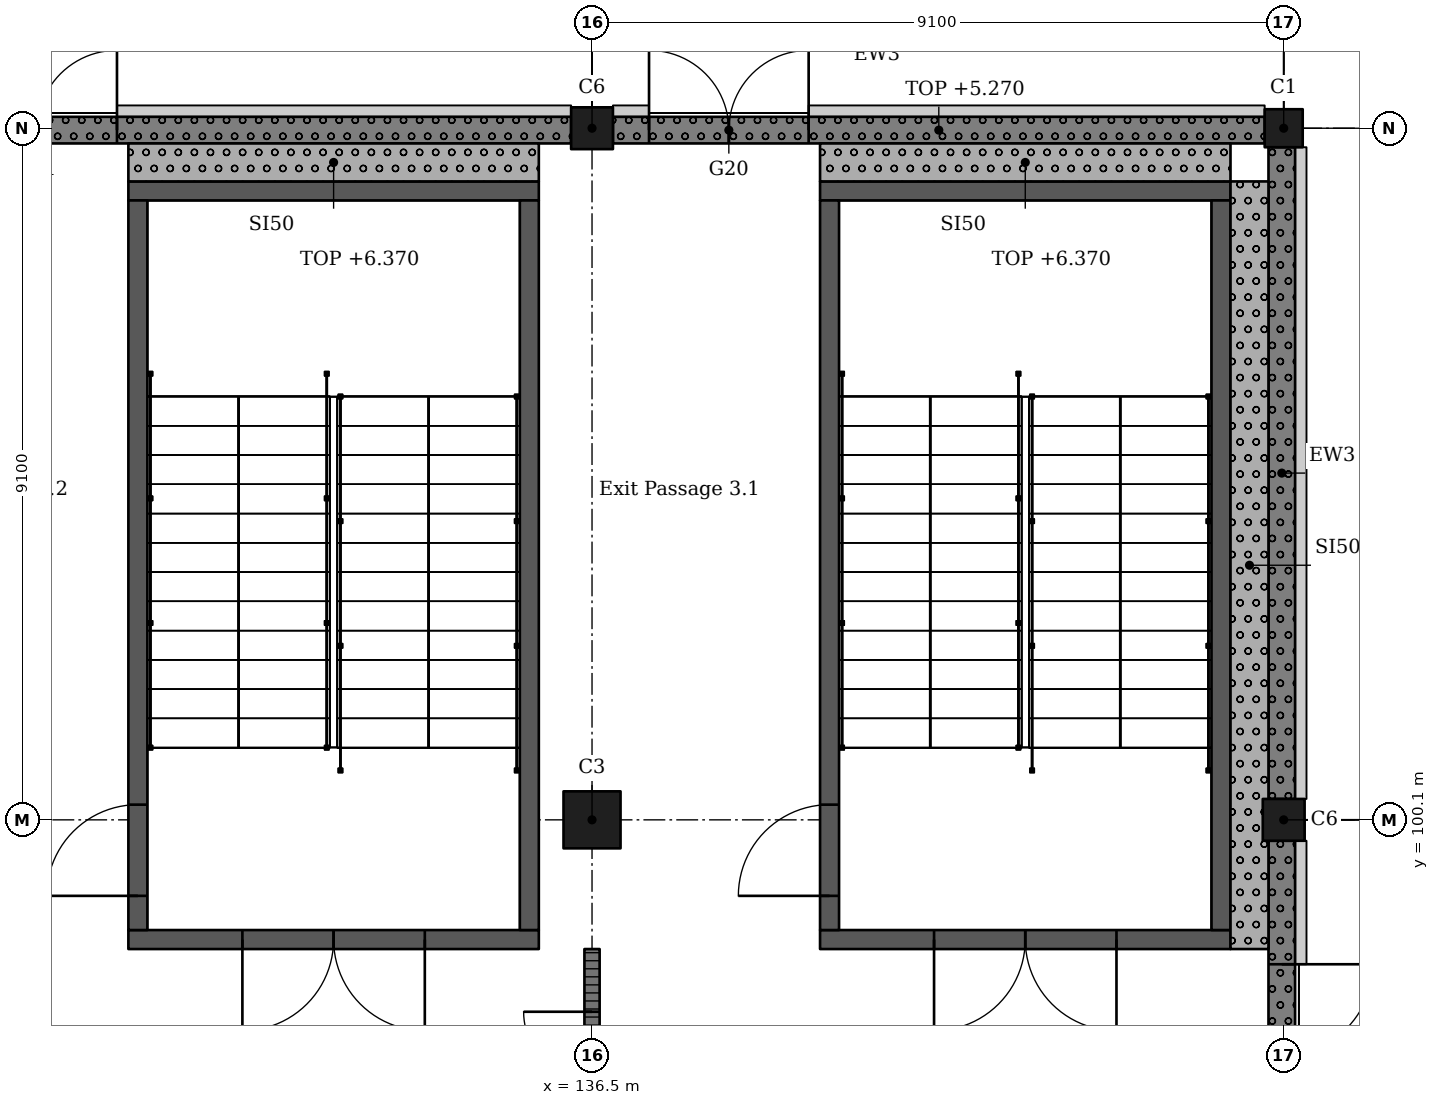
"""IFC4 building model, lengths in metres.
Left out: names, types, materials, properties, quantities, classifications, styles, units other than length and angle.
Written with IfcOpenShell. Run it as: python <this file> out.ifc"""

import sys

from ifc_helpers import new_model, si_unit, direction, frame, frame_2d, origin, origin_2d, place, context, subcontext, project, spatial, rectangle, extrude, element, fill, save


model = new_model("IFC4")
c1 = context("Model", 3, precision=1e-05, world=origin(), true_north=direction((0.0, 1.0)))
c2 = subcontext(c1, "Body", "Model", "MODEL_VIEW")
j1 = project(units=[si_unit("LENGTHUNIT", "METRE"), si_unit("PLANEANGLEUNIT", "RADIAN")], contexts=[c1])
p1 = place(None, origin())
s1 = spatial("IfcSite", under=j1, at=p1, CompositionType="ELEMENT")
p2 = place(p1, origin())
s2 = spatial("IfcBuilding", under=s1, at=p2, CompositionType="ELEMENT")
p3 = place(p2, origin())
s3 = spatial("IfcBuildingStorey", under=s2, at=p3, CompositionType="ELEMENT", Elevation=0.0)
p4 = place(p3, frame((136.5, 100.1, -0.4), z_axis=(0.0, 0.0, 1.0), x_axis=(1.0, 0.0, 0.0)))
e1 = element("IfcColumn", 1, at=p4, inside=s3, PredefinedType="COLUMN", context=c2, shape_type="SweptSolid", body=[
    extrude(rectangle(XDim=0.75, YDim=0.75, at=origin_2d()), origin(), (0.0, 0.0, 1.0), 6.77),
])
for number, where, z_axis, x_axis in (
    (2, (136.5, 109.2, -0.4), (0.0, 0.0, 1.0), (1.0, 0.0, 0.0)),
    (3, (145.6, 100.1, -0.4), (0.0, 0.0, 1.0), (1.0, 0.0, 0.0)),
):
    element("IfcColumn", number, at=place(p3, frame(where, z_axis=z_axis, x_axis=x_axis)), inside=s3, PredefinedType="COLUMN", context=c2, shape_type="SweptSolid", body=[
        extrude(rectangle(XDim=0.55, YDim=0.55, at=origin_2d()), origin(), (0.0, 0.0, 1.0), 6.77),
    ])
p5 = place(p3, frame((145.6, 109.2, -0.4), z_axis=(0.0, 0.0, 1.0), x_axis=(1.0, 0.0, 0.0)))
e4 = element("IfcColumn", 4, at=p5, inside=s3, PredefinedType="COLUMN", context=c2, shape_type="SweptSolid", body=[
    extrude(rectangle(XDim=0.5, YDim=0.5, at=origin_2d()), origin(), (0.0, 0.0, 1.0), 6.77),
])
p6 = place(p3, frame((144.9, 98.525, -0.4), z_axis=(0.0, 0.0, 1.0), x_axis=(-1.0, 0.0, 0.0)))
e5 = element("IfcWall", 5, at=p6, inside=s3, PredefinedType="SHEAR", context=c2, shape_type="SweptSolid", body=[
    extrude(rectangle(XDim=5.4, YDim=0.25, at=frame_2d((2.7, 0.0))), origin(), (0.0, 0.0, 1.0), 6.77),
])
p7 = place(p6, frame((1.5, 0.0, 0.4)))
e6 = element("IfcOpeningElement", 6, at=p7, cuts=e5, PredefinedType="OPENING", context=c2, shape_type="SweptSolid", body=[
    extrude(rectangle(XDim=2.4, YDim=2.1, at=frame_2d((1.2, 1.05))), frame((0.0, 0.135, 0.0), z_axis=(0.0, -1.0, 0.0), x_axis=(1.0, 0.0, 0.0)), (0.0, 0.0, 1.0), 0.27),
])
p8 = place(p3, frame((144.9, 108.375, -0.4), z_axis=(0.0, 0.0, 1.0), x_axis=(-1.0, 0.0, 0.0)))
e7 = element("IfcWall", 7, at=p8, inside=s3, PredefinedType="SHEAR", context=c2, shape_type="SweptSolid", body=[
    extrude(rectangle(XDim=5.4, YDim=0.25, at=frame_2d((2.7, 0.0))), origin(), (0.0, 0.0, 1.0), 6.77),
])
p9 = place(p3, frame((139.625, 108.25, -0.4), z_axis=(0.0, 0.0, 1.0), x_axis=(0.0, -1.0, 0.0)))
e8 = element("IfcWall", 8, at=p9, inside=s3, PredefinedType="SHEAR", context=c2, shape_type="SweptSolid", body=[
    extrude(rectangle(XDim=9.6, YDim=0.25, at=frame_2d((4.8, 0.0))), origin(), (0.0, 0.0, 1.0), 6.77),
])
p10 = place(p9, frame((7.95, 0.0, 0.4)))
e9 = element("IfcOpeningElement", 9, at=p10, cuts=e8, PredefinedType="OPENING", context=c2, shape_type="SweptSolid", body=[
    extrude(rectangle(XDim=1.2, YDim=2.1, at=frame_2d((0.6, 1.05))), frame((0.0, 0.135, 0.0), z_axis=(0.0, -1.0, 0.0), x_axis=(1.0, 0.0, 0.0)), (0.0, 0.0, 1.0), 0.27),
])
p11 = place(p3, frame((144.775, 108.25, -0.4), z_axis=(0.0, 0.0, 1.0), x_axis=(0.0, -1.0, 0.0)))
e10 = element("IfcWall", 10, at=p11, inside=s3, PredefinedType="SHEAR", context=c2, shape_type="SweptSolid", body=[
    extrude(rectangle(XDim=9.6, YDim=0.25, at=frame_2d((4.8, 0.0))), origin(), (0.0, 0.0, 1.0), 6.77),
])
p12 = place(p3, frame((135.8, 98.525, -0.4), z_axis=(0.0, 0.0, 1.0), x_axis=(-1.0, 0.0, 0.0)))
e11 = element("IfcWall", 11, at=p12, inside=s3, PredefinedType="SHEAR", context=c2, shape_type="SweptSolid", body=[
    extrude(rectangle(XDim=5.4, YDim=0.25, at=frame_2d((2.7, 0.0))), origin(), (0.0, 0.0, 1.0), 6.77),
])
p13 = place(p12, frame((1.5, 0.0, 0.4)))
e12 = element("IfcOpeningElement", 12, at=p13, cuts=e11, PredefinedType="OPENING", context=c2, shape_type="SweptSolid", body=[
    extrude(rectangle(XDim=2.4, YDim=2.1, at=frame_2d((1.2, 1.05))), frame((0.0, 0.135, 0.0), z_axis=(0.0, -1.0, 0.0), x_axis=(1.0, 0.0, 0.0)), (0.0, 0.0, 1.0), 0.27),
])
p14 = place(p3, frame((135.8, 108.375, -0.4), z_axis=(0.0, 0.0, 1.0), x_axis=(-1.0, 0.0, 0.0)))
e13 = element("IfcWall", 13, at=p14, inside=s3, PredefinedType="SHEAR", context=c2, shape_type="SweptSolid", body=[
    extrude(rectangle(XDim=5.4, YDim=0.25, at=frame_2d((2.7, 0.0))), origin(), (0.0, 0.0, 1.0), 6.77),
])
p15 = place(p3, frame((130.525, 108.25, -0.4), z_axis=(0.0, 0.0, 1.0), x_axis=(0.0, -1.0, 0.0)))
e14 = element("IfcWall", 14, at=p15, inside=s3, PredefinedType="SHEAR", context=c2, shape_type="SweptSolid", body=[
    extrude(rectangle(XDim=9.6, YDim=0.25, at=frame_2d((4.8, 0.0))), origin(), (0.0, 0.0, 1.0), 6.77),
])
p16 = place(p15, frame((7.95, 0.0, 0.4)))
e15 = element("IfcOpeningElement", 15, at=p16, cuts=e14, PredefinedType="OPENING", context=c2, shape_type="SweptSolid", body=[
    extrude(rectangle(XDim=1.2, YDim=2.1, at=frame_2d((0.6, 1.05))), frame((0.0, 0.135, 0.0), z_axis=(0.0, -1.0, 0.0), x_axis=(1.0, 0.0, 0.0)), (0.0, 0.0, 1.0), 0.27),
])
p17 = place(p3, frame((135.675, 108.25, -0.4), z_axis=(0.0, 0.0, 1.0), x_axis=(0.0, -1.0, 0.0)))
e16 = element("IfcWall", 16, at=p17, inside=s3, PredefinedType="SHEAR", context=c2, shape_type="SweptSolid", body=[
    extrude(rectangle(XDim=9.6, YDim=0.25, at=frame_2d((4.8, 0.0))), origin(), (0.0, 0.0, 1.0), 6.77),
])
p18 = place(p3, frame((145.575, 91.325, 0.0), z_axis=(0.0, 0.0, 1.0), x_axis=(0.0, 1.0, 0.0)))
e17 = element("IfcWall", 17, at=p18, inside=s3, PredefinedType="SOLIDWALL", context=c2, shape_type="SweptSolid", body=[
    extrude(rectangle(XDim=8.5, YDim=0.35, at=frame_2d((4.25, 0.0))), origin(), (0.0, 0.0, 1.0), 5.27),
])
p19 = place(p18, frame((4.475, 0.0, 0.0)))
e18 = element("IfcOpeningElement", 18, at=p19, cuts=e17, PredefinedType="OPENING", context=c2, shape_type="SweptSolid", body=[
    extrude(rectangle(XDim=2.4, YDim=2.4, at=frame_2d((1.2, 1.2))), frame((0.0, 0.185, 0.0), z_axis=(0.0, -1.0, 0.0), x_axis=(1.0, 0.0, 0.0)), (0.0, 0.0, 1.0), 0.37),
])
p20 = place(p18, frame((1.475, 0.0, 0.0)))
e19 = element("IfcOpeningElement", 19, at=p20, cuts=e17, PredefinedType="OPENING", context=c2, shape_type="SweptSolid", body=[
    extrude(rectangle(XDim=2.4, YDim=2.4, at=frame_2d((1.2, 1.2))), frame((0.0, 0.185, 0.0), z_axis=(0.0, -1.0, 0.0), x_axis=(1.0, 0.0, 0.0)), (0.0, 0.0, 1.0), 0.37),
])
p21 = place(p3, frame((145.575, 100.375, 0.0), z_axis=(0.0, 0.0, 1.0), x_axis=(0.0, 1.0, 0.0)))
e20 = element("IfcWall", 20, at=p21, inside=s3, PredefinedType="SOLIDWALL", context=c2, shape_type="SweptSolid", body=[
    extrude(rectangle(XDim=8.575, YDim=0.35, at=frame_2d((4.288, 0.0))), origin(), (0.0, 0.0, 1.0), 5.27),
])
p22 = place(p3, frame((145.35, 109.175, 0.0), z_axis=(0.0, 0.0, 1.0), x_axis=(-1.0, 0.0, 0.0)))
e21 = element("IfcWall", 21, at=p22, inside=s3, PredefinedType="SOLIDWALL", context=c2, shape_type="SweptSolid", body=[
    extrude(rectangle(XDim=8.575, YDim=0.35, at=frame_2d((4.288, 0.0))), origin(), (0.0, 0.0, 1.0), 5.27),
])
p23 = place(p22, frame((6.0, 0.0, 0.0)))
e22 = element("IfcOpeningElement", 22, at=p23, cuts=e21, PredefinedType="OPENING", context=c2, shape_type="SweptSolid", body=[
    extrude(rectangle(XDim=2.1, YDim=2.4, at=frame_2d((1.05, 1.2))), frame((0.0, 0.185, 0.0), z_axis=(0.0, -1.0, 0.0), x_axis=(1.0, 0.0, 0.0)), (0.0, 0.0, 1.0), 0.37),
])
p24 = place(p3, frame((136.225, 109.175, 0.0), z_axis=(0.0, 0.0, 1.0), x_axis=(-1.0, 0.0, 0.0)))
e23 = element("IfcWall", 23, at=p24, inside=s3, PredefinedType="SOLIDWALL", context=c2, shape_type="SweptSolid", body=[
    extrude(rectangle(XDim=8.55, YDim=0.35, at=frame_2d((4.275, 0.0))), origin(), (0.0, 0.0, 1.0), 5.27),
])
p25 = place(p24, frame((5.975, 0.0, 0.0)))
e24 = element("IfcOpeningElement", 24, at=p25, cuts=e23, PredefinedType="OPENING", context=c2, shape_type="SweptSolid", body=[
    extrude(rectangle(XDim=2.1, YDim=2.4, at=frame_2d((1.05, 1.2))), frame((0.0, 0.185, 0.0), z_axis=(0.0, -1.0, 0.0), x_axis=(1.0, 0.0, 0.0)), (0.0, 0.0, 1.0), 0.37),
])
p26 = place(p3, frame((139.5, 108.75, 0.0), z_axis=(0.0, 0.0, 1.0), x_axis=(1.0, 0.0, 0.0)))
e25 = element("IfcWall", 25, at=p26, inside=s3, PredefinedType="SOLIDWALL", context=c2, shape_type="SweptSolid", body=[
    extrude(rectangle(XDim=5.4, YDim=0.5, at=frame_2d((2.7, 0.0))), origin(), (0.0, 0.0, 1.0), 6.37),
])
p27 = place(p3, frame((145.15, 98.4, 0.0), z_axis=(0.0, 0.0, 1.0), x_axis=(0.0, 1.0, 0.0)))
e26 = element("IfcWall", 26, at=p27, inside=s3, PredefinedType="SOLIDWALL", context=c2, shape_type="SweptSolid", body=[
    extrude(rectangle(XDim=10.1, YDim=0.5, at=frame_2d((5.05, 0.0))), origin(), (0.0, 0.0, 1.0), 6.37),
])
p28 = place(p3, frame((130.4, 108.75, 0.0), z_axis=(0.0, 0.0, 1.0), x_axis=(1.0, 0.0, 0.0)))
e27 = element("IfcWall", 27, at=p28, inside=s3, PredefinedType="SOLIDWALL", context=c2, shape_type="SweptSolid", body=[
    extrude(rectangle(XDim=5.4, YDim=0.5, at=frame_2d((2.7, 0.0))), origin(), (0.0, 0.0, 1.0), 6.37),
])
p29 = place(p3, frame((136.5, 91.425, 0.0), z_axis=(0.0, 0.0, 1.0), x_axis=(0.0, 1.0, 0.0)))
e28 = element("IfcWall", 28, at=p29, inside=s3, PredefinedType="PARTITIONING", context=c2, shape_type="SweptSolid", body=[
    extrude(rectangle(XDim=6.975, YDim=0.2, at=frame_2d((3.487, 0.0))), origin(), (0.0, 0.0, 1.0), 5.32),
])
p30 = place(p29, frame((0.85, 0.0, 0.0)))
e29 = element("IfcOpeningElement", 29, at=p30, cuts=e28, PredefinedType="OPENING", context=c2, shape_type="SweptSolid", body=[
    extrude(rectangle(XDim=1.8, YDim=2.4, at=frame_2d((0.9, 1.2))), frame((0.0, 0.11, 0.0), z_axis=(0.0, -1.0, 0.0), x_axis=(1.0, 0.0, 0.0)), (0.0, 0.0, 1.0), 0.22),
])
p31 = place(p29, frame((4.35, 0.0, 0.0)))
e30 = element("IfcOpeningElement", 30, at=p31, cuts=e28, PredefinedType="OPENING", context=c2, shape_type="SweptSolid", body=[
    extrude(rectangle(XDim=1.8, YDim=2.4, at=frame_2d((0.9, 1.2))), frame((0.0, 0.11, 0.0), z_axis=(0.0, -1.0, 0.0), x_axis=(1.0, 0.0, 0.0)), (0.0, 0.0, 1.0), 0.22),
])
p32 = place(p19, frame((2.4, 0.0, 0.0), z_axis=(0.0, 0.0, 1.0), x_axis=(-1.0, 0.0, 0.0)))
e31 = element("IfcDoor", 31, at=p32, inside=s3, OperationType="DOUBLE_DOOR_SINGLE_SWING", PredefinedType="DOOR", context=c2, shape_type="SweptSolid", body=[
    extrude(rectangle(XDim=2.4, YDim=2.4, at=frame_2d((1.2, 1.2))), frame((0.0, 0.025, 0.0), z_axis=(0.0, -1.0, 0.0), x_axis=(1.0, 0.0, 0.0)), (0.0, 0.0, 1.0), 0.05),
])
fill(e18, e31)
p33 = place(p23, frame((2.1, 0.0, 0.0), z_axis=(0.0, 0.0, 1.0), x_axis=(-1.0, 0.0, 0.0)))
e32 = element("IfcDoor", 32, at=p33, inside=s3, OperationType="DOUBLE_DOOR_SINGLE_SWING", PredefinedType="DOOR", context=c2, shape_type="SweptSolid", body=[
    extrude(rectangle(XDim=2.1, YDim=2.4, at=frame_2d((1.05, 1.2))), frame((0.0, 0.025, 0.0), z_axis=(0.0, -1.0, 0.0), x_axis=(1.0, 0.0, 0.0)), (0.0, 0.0, 1.0), 0.05),
])
fill(e22, e32)
p34 = place(p25, frame((2.1, 0.0, 0.0), z_axis=(0.0, 0.0, 1.0), x_axis=(-1.0, 0.0, 0.0)))
e33 = element("IfcDoor", 33, at=p34, inside=s3, OperationType="DOUBLE_DOOR_SINGLE_SWING", PredefinedType="DOOR", context=c2, shape_type="SweptSolid", body=[
    extrude(rectangle(XDim=2.1, YDim=2.4, at=frame_2d((1.05, 1.2))), frame((0.0, 0.025, 0.0), z_axis=(0.0, -1.0, 0.0), x_axis=(1.0, 0.0, 0.0)), (0.0, 0.0, 1.0), 0.05),
])
fill(e24, e33)
p35 = place(p31, origin())
e34 = element("IfcDoor", 34, at=p35, inside=s3, OperationType="DOUBLE_DOOR_SINGLE_SWING", PredefinedType="DOOR", context=c2, shape_type="SweptSolid", body=[
    extrude(rectangle(XDim=1.8, YDim=2.4, at=frame_2d((0.9, 1.2))), frame((0.0, 0.025, 0.0), z_axis=(0.0, -1.0, 0.0), x_axis=(1.0, 0.0, 0.0)), (0.0, 0.0, 1.0), 0.05),
])
fill(e30, e34)
p36 = place(p7, origin())
e35 = element("IfcDoor", 35, at=p36, inside=s3, OperationType="DOUBLE_DOOR_SINGLE_SWING", PredefinedType="DOOR", context=c2, shape_type="SweptSolid", body=[
    extrude(rectangle(XDim=2.4, YDim=2.1, at=frame_2d((1.2, 1.05))), frame((0.0, 0.025, 0.0), z_axis=(0.0, -1.0, 0.0), x_axis=(1.0, 0.0, 0.0)), (0.0, 0.0, 1.0), 0.05),
])
fill(e6, e35)
p37 = place(p13, origin())
e36 = element("IfcDoor", 36, at=p37, inside=s3, OperationType="DOUBLE_DOOR_SINGLE_SWING", PredefinedType="DOOR", context=c2, shape_type="SweptSolid", body=[
    extrude(rectangle(XDim=2.4, YDim=2.1, at=frame_2d((1.2, 1.05))), frame((0.0, 0.025, 0.0), z_axis=(0.0, -1.0, 0.0), x_axis=(1.0, 0.0, 0.0)), (0.0, 0.0, 1.0), 0.05),
])
fill(e12, e36)
p38 = place(p10, origin())
e37 = element("IfcDoor", 37, at=p38, inside=s3, OperationType="SINGLE_SWING_RIGHT", PredefinedType="DOOR", context=c2, shape_type="SweptSolid", body=[
    extrude(rectangle(XDim=1.2, YDim=2.1, at=frame_2d((0.6, 1.05))), frame((0.0, 0.025, 0.0), z_axis=(0.0, -1.0, 0.0), x_axis=(1.0, 0.0, 0.0)), (0.0, 0.0, 1.0), 0.05),
])
fill(e9, e37)
p39 = place(p16, origin())
e38 = element("IfcDoor", 38, at=p39, inside=s3, OperationType="SINGLE_SWING_RIGHT", PredefinedType="DOOR", context=c2, shape_type="SweptSolid", body=[
    extrude(rectangle(XDim=1.2, YDim=2.1, at=frame_2d((0.6, 1.05))), frame((0.0, 0.025, 0.0), z_axis=(0.0, -1.0, 0.0), x_axis=(1.0, 0.0, 0.0)), (0.0, 0.0, 1.0), 0.05),
])
fill(e15, e38)
save(model, sys.argv[1])
